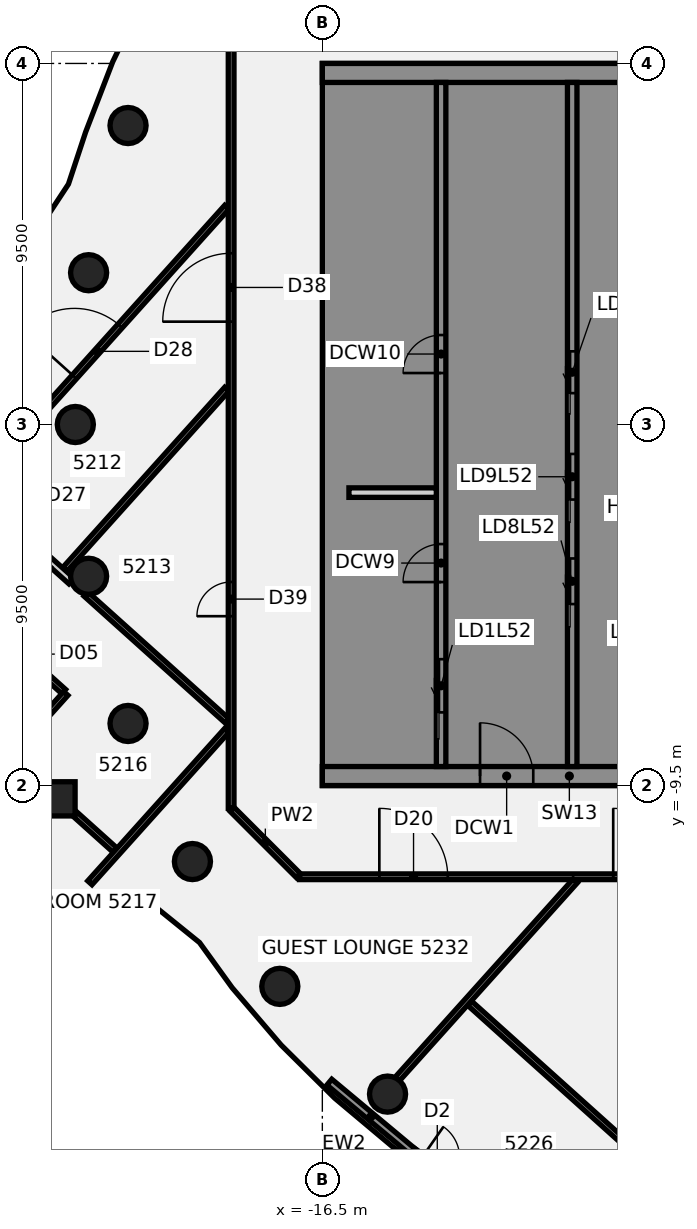
"""IFC4 building model, lengths in metres.
Left out: names, types, materials, properties, quantities, classifications, styles, units other than length and angle.
Written with IfcOpenShell. Run it as: python <this file> out.ifc"""

import sys

from ifc_helpers import new_model, si_unit, direction, frame, frame_2d, origin, origin_2d, place, context, subcontext, project, spatial, polyline, rectangle, circle, outline, extrude, element, fill, save


model = new_model("IFC4")
c1 = context("Model", 3, precision=1e-05, world=origin(), true_north=direction((0.0, 1.0)))
c2 = subcontext(c1, "Body", "Model", "MODEL_VIEW")
j1 = project(units=[si_unit("LENGTHUNIT", "METRE"), si_unit("PLANEANGLEUNIT", "RADIAN")], contexts=[c1])
p1 = place(None, origin())
s1 = spatial("IfcSite", under=j1, at=p1, CompositionType="ELEMENT")
p2 = place(p1, origin())
s2 = spatial("IfcBuilding", under=s1, at=p2, CompositionType="ELEMENT")
p3 = place(p2, frame((0.0, 0.0, 207.7)))
s3 = spatial("IfcBuildingStorey", under=s2, at=p3, CompositionType="ELEMENT", Elevation=207.7)
for number, where, z_axis, x_axis in (
    (1, (-21.613, 7.866, -0.14), (0.0, 0.0, 1.0), (1.0, 0.0, 0.0)),
    (2, (-22.651, 3.994, -0.14), (0.0, 0.0, 1.0), (1.0, 0.0, 0.0)),
    (3, (-23.0, 0.0, -0.14), (0.0, 0.0, 1.0), (1.0, 0.0, 0.0)),
    (4, (-22.651, -3.994, -0.14), (0.0, 0.0, 1.0), (1.0, 0.0, 0.0)),
    (5, (-21.613, -7.866, -0.14), (0.0, 0.0, 1.0), (1.0, 0.0, 0.0)),
    (6, (-19.919, -11.5, -0.14), (0.0, 0.0, 1.0), (1.0, 0.0, 0.0)),
    (7, (-17.619, -14.784, -0.14), (0.0, 0.0, 1.0), (1.0, 0.0, 0.0)),
    (8, (-14.784, -17.619, -0.14), (0.0, 0.0, 1.0), (1.0, 0.0, 0.0)),
):
    element("IfcColumn", number, at=place(p3, frame(where, z_axis=z_axis, x_axis=x_axis)), inside=s3, PredefinedType="COLUMN", context=c2, shape_type="SweptSolid", body=[
        extrude(circle(Radius=0.475, at=origin_2d()), origin(), (0.0, 0.0, 1.0), 3.6),
    ])
p4 = place(p3, frame((-23.456, -9.85, -0.139), z_axis=(0.049885715582, -0.006913509496, 0.998731004209), x_axis=(-0.742767998212, 0.668247415628, 0.04172639858)))
e9 = element("IfcColumn", 9, at=p4, inside=s3, PredefinedType="COLUMN", context=c2, shape_type="SweptSolid", body=[
    extrude(rectangle(XDim=0.9, YDim=0.9, at=origin_2d()), origin(), (0.0, 0.0, 1.0), 3.602),
])
p5 = place(p3, frame((-18.872, -10.128, 0.0), z_axis=(0.0, 0.0, 1.0), x_axis=(0.707106781187, -0.707106781187, 0.0)))
e10 = element("IfcWall", 10, at=p5, inside=s3, PredefinedType="PARTITIONING", context=c2, shape_type="SweptSolid", body=[
    extrude(rectangle(XDim=2.465, YDim=0.15, at=frame_2d((1.232, 0.0))), origin(), (0.0, 0.0, 1.0), 2.864),
])
p6 = place(p3, frame((-29.523, 1.65, 0.0), z_axis=(0.0, 0.0, 1.0), x_axis=(0.743912674532, -0.668276838346, 0.0)))
e11 = element("IfcWall", 11, at=p6, inside=s3, PredefinedType="PARTITIONING", context=c2, shape_type="SweptSolid", body=[
    extrude(rectangle(XDim=8.631, YDim=0.2, at=frame_2d((4.316, 0.0))), origin(), (0.0, 0.0, 1.0), 2.864),
])
p7 = place(p6, frame((5.8, 0.0, 0.0)))
e12 = element("IfcOpeningElement", 12, at=p7, cuts=e11, PredefinedType="OPENING", context=c2, shape_type="SweptSolid", body=[
    extrude(rectangle(XDim=1.4, YDim=2.1, at=frame_2d((0.7, 1.05))), frame((0.0, 0.11, 0.0), z_axis=(0.0, -1.0, 0.0), x_axis=(1.0, 0.0, 0.0)), (0.0, 0.0, 1.0), 0.22),
])
p8 = place(p3, frame((-22.722, -4.46, 0.0), z_axis=(0.0, 0.0, 1.0), x_axis=(0.743940554758, -0.668245801323, 0.0)))
e13 = element("IfcWall", 13, at=p8, inside=s3, PredefinedType="PARTITIONING", context=c2, shape_type="SweptSolid", body=[
    extrude(rectangle(XDim=4.993, YDim=0.15, at=frame_2d((2.497, 0.0))), origin(), (0.0, 0.0, 1.0), 2.864),
])
p9 = place(p3, frame((-23.007, -10.254, 0.0), z_axis=(0.0, 0.0, 1.0), x_axis=(0.743791407792, -0.668411805472, 0.0)))
e14 = element("IfcWall", 14, at=p9, inside=s3, PredefinedType="PARTITIONING", context=c2, shape_type="SweptSolid", body=[
    extrude(rectangle(XDim=1.415, YDim=0.15, at=frame_2d((0.708, 0.0))), origin(), (0.0, 0.0, 1.0), 2.864),
])
p10 = place(p3, frame((-25.125, -5.394, 0.0), z_axis=(0.0, 0.0, 1.0), x_axis=(0.743993991254, -0.668186307087, 0.0)))
e15 = element("IfcWall", 15, at=p10, inside=s3, PredefinedType="PARTITIONING", context=c2, shape_type="SweptSolid", body=[
    extrude(rectangle(XDim=2.444, YDim=0.15, at=frame_2d((1.222, 0.0))), origin(), (0.0, 0.0, 1.0), 2.864),
])
p11 = place(p10, frame((0.52, 0.0, 0.0)))
e16 = element("IfcOpeningElement", 16, at=p11, cuts=e15, PredefinedType="OPENING", context=c2, shape_type="SweptSolid", body=[
    extrude(rectangle(XDim=0.9, YDim=2.1, at=frame_2d((0.45, 1.05))), frame((0.0, 0.085, 0.0), z_axis=(0.0, -1.0, 0.0), x_axis=(1.0, 0.0, 0.0)), (0.0, 0.0, 1.0), 0.17),
])
p12 = place(p3, frame((-12.626, -15.226, 0.0), z_axis=(0.0, 0.0, 1.0), x_axis=(0.743821581371, -0.668378227567, 0.0)))
e17 = element("IfcWall", 17, at=p12, inside=s3, PredefinedType="PARTITIONING", context=c2, shape_type="SweptSolid", body=[
    extrude(rectangle(XDim=11.158, YDim=0.15, at=frame_2d((5.579, 0.0))), origin(), (0.0, 0.0, 1.0), 2.864),
])
p13 = place(p12, frame((6.37, 0.0, 0.0)))
e18 = element("IfcOpeningElement", 18, at=p13, cuts=e17, PredefinedType="OPENING", context=c2, shape_type="SweptSolid", body=[
    extrude(rectangle(XDim=0.9, YDim=2.1, at=frame_2d((0.45, 1.05))), frame((0.0, 0.085, 0.0), z_axis=(0.0, -1.0, 0.0), x_axis=(1.0, 0.0, 0.0)), (0.0, 0.0, 1.0), 0.17),
])
p14 = place(p3, frame((-17.1, -11.9, 0.0), z_axis=(0.0, 0.0, 1.0), x_axis=(1.0, 0.0, 0.0)))
e19 = element("IfcWall", 19, at=p14, inside=s3, PredefinedType="PARTITIONING", context=c2, shape_type="SweptSolid", body=[
    extrude(rectangle(XDim=34.165, YDim=0.15, at=frame_2d((17.083, 0.0))), origin(), (0.0, 0.0, 1.0), 2.864),
])
p15 = place(p14, frame((8.254, 0.0, 0.0)))
e20 = element("IfcOpeningElement", 20, at=p15, cuts=e19, PredefinedType="OPENING", context=c2, shape_type="SweptSolid", body=[
    extrude(rectangle(XDim=1.8, YDim=2.1, at=frame_2d((0.9, 1.05))), frame((0.0, 0.085, 0.0), z_axis=(0.0, -1.0, 0.0), x_axis=(1.0, 0.0, 0.0)), (0.0, 0.0, 1.0), 0.17),
])
p16 = place(p14, frame((2.1, 0.0, 0.0)))
e21 = element("IfcOpeningElement", 21, at=p16, cuts=e19, PredefinedType="OPENING", context=c2, shape_type="SweptSolid", body=[
    extrude(rectangle(XDim=1.8, YDim=2.1, at=frame_2d((0.9, 1.05))), frame((0.0, 0.085, 0.0), z_axis=(0.0, -1.0, 0.0), x_axis=(1.0, 0.0, 0.0)), (0.0, 0.0, 1.0), 0.17),
])
p17 = place(p14, frame((24.936, 0.0, 0.0)))
e22 = element("IfcOpeningElement", 22, at=p17, cuts=e19, PredefinedType="OPENING", context=c2, shape_type="SweptSolid", body=[
    extrude(rectangle(XDim=1.8, YDim=2.1, at=frame_2d((0.9, 1.05))), frame((0.0, 0.085, 0.0), z_axis=(0.0, -1.0, 0.0), x_axis=(1.0, 0.0, 0.0)), (0.0, 0.0, 1.0), 0.17),
])
p18 = place(p3, frame((-26.191, -10.35, 0.0), z_axis=(0.0, 0.0, 1.0), x_axis=(0.66834223487, 0.743853921875, 0.0)))
e23 = element("IfcWall", 23, at=p18, inside=s3, PredefinedType="PARTITIONING", context=c2, shape_type="SweptSolid", body=[
    extrude(rectangle(XDim=4.4, YDim=0.15, at=frame_2d((2.2, 0.0))), origin(), (0.0, 0.0, 1.0), 2.864),
])
p19 = place(p3, frame((-25.663, -1.683, 0.0), z_axis=(0.0, 0.0, 1.0), x_axis=(0.668369322351, 0.743829583265, 0.0)))
e24 = element("IfcWall", 24, at=p19, inside=s3, PredefinedType="PARTITIONING", context=c2, shape_type="SweptSolid", body=[
    extrude(rectangle(XDim=9.949, YDim=0.15, at=frame_2d((4.974, 0.0))), origin(), (0.0, 0.0, 1.0), 2.864),
])
p20 = place(p19, frame((3.95, 0.0, 0.0)))
e25 = element("IfcOpeningElement", 25, at=p20, cuts=e24, PredefinedType="OPENING", context=c2, shape_type="SweptSolid", body=[
    extrude(rectangle(XDim=1.8, YDim=2.1, at=frame_2d((0.9, 1.05))), frame((0.0, 0.085, 0.0), z_axis=(0.0, -1.0, 0.0), x_axis=(1.0, 0.0, 0.0)), (0.0, 0.0, 1.0), 0.17),
])
p21 = place(p3, frame((-23.27, -3.807, 0.0), z_axis=(0.0, 0.0, 1.0), x_axis=(0.668392601197, 0.74380866536, 0.0)))
e26 = element("IfcWall", 26, at=p21, inside=s3, PredefinedType="PARTITIONING", context=c2, shape_type="SweptSolid", body=[
    extrude(rectangle(XDim=6.368, YDim=0.15, at=frame_2d((3.184, 0.0))), origin(), (0.0, 0.0, 1.0), 2.864),
])
p22 = place(p3, frame((-22.617, -12.059, 0.0), z_axis=(0.0, 0.0, 1.0), x_axis=(0.668266543516, 0.743921922528, 0.0)))
e27 = element("IfcWall", 27, at=p22, inside=s3, PredefinedType="PARTITIONING", context=c2, shape_type="SweptSolid", body=[
    extrude(rectangle(XDim=5.392, YDim=0.15, at=frame_2d((2.696, 0.0))), origin(), (0.0, 0.0, 1.0), 2.864),
])
p23 = place(p3, frame((-14.523, -17.217, 0.0), z_axis=(0.0, 0.0, 1.0), x_axis=(0.668288418093, 0.743902271971, 0.0)))
e28 = element("IfcWall", 28, at=p23, inside=s3, PredefinedType="PARTITIONING", context=c2, shape_type="SweptSolid", body=[
    extrude(rectangle(XDim=7.003, YDim=0.15, at=frame_2d((3.501, 0.0))), origin(), (0.0, 0.0, 1.0), 2.864),
])
p24 = place(p3, frame((-18.9, -10.1, 0.0), z_axis=(0.0, 0.0, 1.0), x_axis=(0.0, 1.0, 0.0)))
e29 = element("IfcWall", 29, at=p24, inside=s3, PredefinedType="PARTITIONING", context=c2, shape_type="SweptSolid", body=[
    extrude(rectangle(XDim=20.2, YDim=0.15, at=frame_2d((10.1, 0.0))), origin(), (0.0, 0.0, 1.0), 2.864),
])
p25 = place(p24, frame((12.806, 0.0, 0.0)))
e30 = element("IfcOpeningElement", 30, at=p25, cuts=e29, PredefinedType="OPENING", context=c2, shape_type="SweptSolid", body=[
    extrude(rectangle(XDim=1.8, YDim=2.1, at=frame_2d((0.9, 1.05))), frame((0.0, 0.085, 0.0), z_axis=(0.0, -1.0, 0.0), x_axis=(1.0, 0.0, 0.0)), (0.0, 0.0, 1.0), 0.17),
])
p26 = place(p24, frame((5.056, 0.0, 0.0)))
e31 = element("IfcOpeningElement", 31, at=p26, cuts=e29, PredefinedType="OPENING", context=c2, shape_type="SweptSolid", body=[
    extrude(rectangle(XDim=0.9, YDim=2.1, at=frame_2d((0.45, 1.05))), frame((0.0, 0.085, 0.0), z_axis=(0.0, -1.0, 0.0), x_axis=(1.0, 0.0, 0.0)), (0.0, 0.0, 1.0), 0.17),
])
p27 = place(p3, frame((-16.315, -17.304, 0.0), z_axis=(0.0, 0.0, 1.0), x_axis=(0.767848233203, -0.640631790318, 0.0)))
e32 = element("IfcWall", 32, at=p27, inside=s3, PredefinedType="SOLIDWALL", context=c2, shape_type="SweptSolid", body=[
    extrude(rectangle(XDim=2.844, YDim=0.2, at=frame_2d((1.422, 0.0))), origin(), (0.0, 0.0, 1.0), 3.46),
])
p28 = place(p3, frame((-14.132, -19.126, 0.0), z_axis=(0.0, 0.0, 1.0), x_axis=(0.820148605053, -0.572150562029, 0.0)))
e33 = element("IfcWall", 33, at=p28, inside=s3, PredefinedType="SOLIDWALL", context=c2, shape_type="SweptSolid", body=[
    extrude(rectangle(XDim=1.6, YDim=0.2, at=frame_2d((0.8, 0.0))), origin(), (0.0, 0.0, 1.0), 3.46),
])
p29 = place(p28, frame((0.3, 0.0, 0.0)))
e34 = element("IfcOpeningElement", 34, at=p29, cuts=e33, PredefinedType="OPENING", context=c2, shape_type="SweptSolid", body=[
    extrude(rectangle(XDim=1.0, YDim=2.4, at=frame_2d((0.5, 1.2))), frame((0.0, 0.11, 0.0), z_axis=(0.0, -1.0, 0.0), x_axis=(1.0, 0.0, 0.0)), (0.0, 0.0, 1.0), 0.22),
])
p30 = place(p3, frame((-16.5, -9.25, 0.0), z_axis=(0.0, 0.0, 1.0), x_axis=(1.0, 0.0, 0.0)))
e35 = element("IfcWall", 35, at=p30, inside=s3, PredefinedType="SHEAR", context=c2, shape_type="SweptSolid", body=[
    extrude(rectangle(XDim=13.0, YDim=0.5, at=frame_2d((6.5, 0.0))), origin(), (0.0, 0.0, 1.0), 3.46),
])
p31 = place(p30, frame((4.15, 0.0, 0.0)))
e36 = element("IfcOpeningElement", 36, at=p31, cuts=e35, PredefinedType="OPENING", context=c2, shape_type="SweptSolid", body=[
    extrude(rectangle(XDim=1.4, YDim=2.1, at=frame_2d((0.7, 1.05))), frame((0.0, 0.26, 0.0), z_axis=(0.0, -1.0, 0.0), x_axis=(1.0, 0.0, 0.0)), (0.0, 0.0, 1.0), 0.52),
])
p32 = place(p30, frame((10.125, 0.0, 0.0)))
e37 = element("IfcOpeningElement", 37, at=p32, cuts=e35, PredefinedType="OPENING", context=c2, shape_type="SweptSolid", body=[
    extrude(rectangle(XDim=1.4, YDim=2.1, at=frame_2d((0.7, 1.05))), frame((0.0, 0.26, 0.0), z_axis=(0.0, -1.0, 0.0), x_axis=(1.0, 0.0, 0.0)), (0.0, 0.0, 1.0), 0.52),
])
p33 = place(p3, origin())
e38 = element("IfcWall", 38, at=p33, inside=s3, PredefinedType="SHEAR", context=c2, shape_type="SweptSolid", body=[
    extrude(outline(polyline([(-13.5, -8.125), (-16.0, -8.125), (-16.0, -5.625), (-13.5, -5.625), (-13.5, -5.375), (-16.0, -5.375), (-16.0, 5.375), (-13.5, 5.375), (-13.5, 5.625), (-16.0, 5.625), (-16.0, 8.125), (-13.5, 8.125), (-13.5, 9.0), (-16.0, 9.0), (-16.5, 9.0), (-16.5, -9.0), (-16.0, -9.0), (-13.5, -9.0), (-13.5, -8.125)])), origin(), (0.0, 0.0, 1.0), 3.46),
])
p34 = place(p3, frame((-16.5, 9.25, 0.0), z_axis=(0.0, 0.0, 1.0), x_axis=(1.0, 0.0, 0.0)))
e39 = element("IfcWall", 39, at=p34, inside=s3, PredefinedType="SHEAR", context=c2, shape_type="SweptSolid", body=[
    extrude(rectangle(XDim=13.0, YDim=0.5, at=frame_2d((6.5, 0.0))), origin(), (0.0, 0.0, 1.0), 3.46),
])
p35 = place(p3, origin())
e40 = element("IfcWall", 40, at=p35, inside=s3, PredefinedType="SHEAR", context=c2, shape_type="SweptSolid", body=[
    extrude(outline(polyline([(-9.8, -5.375), (-9.8, -5.625), (-7.5, -5.625), (-7.25, -5.625), (-7.25, 9.0), (-7.5, 9.0), (-9.8, 9.0), (-9.8, 8.125), (-7.5, 8.125), (-7.5, 5.625), (-9.8, 5.625), (-9.8, 5.375), (-7.5, 5.375), (-7.5, 2.875), (-9.8, 2.875), (-9.8, 2.625), (-7.5, 2.625), (-7.5, 0.125), (-9.8, 0.125), (-9.8, -0.125), (-7.5, -0.125), (-7.5, -2.625), (-9.8, -2.625), (-9.8, -2.875), (-7.5, -2.875), (-7.5, -5.375), (-9.8, -5.375)])), origin(), (0.0, 0.0, 1.0), 3.46),
])
p36 = place(p3, origin())
e41 = element("IfcWall", 41, at=p36, inside=s3, PredefinedType="SHEAR", context=c2, shape_type="SweptSolid", body=[
    extrude(outline(polyline([(-7.5, -8.125), (-9.55, -8.125), (-9.55, -5.625), (-9.8, -5.625), (-9.8, -8.125), (-9.8, -9.0), (-7.5, -9.0), (-7.5, -8.125)])), origin(), (0.0, 0.0, 1.0), 3.46),
])
p37 = place(p3, frame((-13.375, -9.0, 0.0), z_axis=(0.0, 0.0, 1.0), x_axis=(0.0, 1.0, 0.0)))
e42 = element("IfcWall", 42, at=p37, inside=s3, PredefinedType="SHEAR", context=c2, shape_type="SweptSolid", body=[
    extrude(rectangle(XDim=18.0, YDim=0.25, at=frame_2d((9.0, 0.0))), origin(), (0.0, 0.0, 1.0), 3.46),
])
p38 = place(p37, frame((1.425, 0.0, 0.0)))
e43 = element("IfcOpeningElement", 43, at=p38, cuts=e42, PredefinedType="OPENING", context=c2, shape_type="SweptSolid", body=[
    extrude(rectangle(XDim=1.4, YDim=2.1, at=frame_2d((0.7, 1.05))), frame((0.0, 0.135, 0.0), z_axis=(0.0, -1.0, 0.0), x_axis=(1.0, 0.0, 0.0)), (0.0, 0.0, 1.0), 0.27),
])
p39 = place(p37, frame((4.854, 0.0, 0.0)))
e44 = element("IfcOpeningElement", 44, at=p39, cuts=e42, PredefinedType="OPENING", context=c2, shape_type="SweptSolid", body=[
    extrude(rectangle(XDim=1.0, YDim=2.1, at=frame_2d((0.5, 1.05))), frame((0.0, 0.135, 0.0), z_axis=(0.0, -1.0, 0.0), x_axis=(1.0, 0.0, 0.0)), (0.0, 0.0, 1.0), 0.27),
])
p40 = place(p37, frame((10.354, 0.0, 0.0)))
e45 = element("IfcOpeningElement", 45, at=p40, cuts=e42, PredefinedType="OPENING", context=c2, shape_type="SweptSolid", body=[
    extrude(rectangle(XDim=1.0, YDim=2.1, at=frame_2d((0.5, 1.05))), frame((0.0, 0.135, 0.0), z_axis=(0.0, -1.0, 0.0), x_axis=(1.0, 0.0, 0.0)), (0.0, 0.0, 1.0), 0.27),
])
p41 = place(p3, frame((-9.925, -9.0, 0.0), z_axis=(0.0, 0.0, 1.0), x_axis=(0.0, 1.0, 0.0)))
e46 = element("IfcWall", 46, at=p41, inside=s3, PredefinedType="SHEAR", context=c2, shape_type="SweptSolid", body=[
    extrude(rectangle(XDim=18.0, YDim=0.25, at=frame_2d((9.0, 0.0))), origin(), (0.0, 0.0, 1.0), 3.46),
])
p42 = place(p41, frame((4.275, 0.0, 0.0)))
e47 = element("IfcOpeningElement", 47, at=p42, cuts=e46, PredefinedType="OPENING", context=c2, shape_type="SweptSolid", body=[
    extrude(rectangle(XDim=1.2, YDim=2.1, at=frame_2d((0.6, 1.05))), frame((0.0, 0.135, 0.0), z_axis=(0.0, -1.0, 0.0), x_axis=(1.0, 0.0, 0.0)), (0.0, 0.0, 1.0), 0.27),
])
p43 = place(p41, frame((7.025, 0.0, 0.0)))
e48 = element("IfcOpeningElement", 48, at=p43, cuts=e46, PredefinedType="OPENING", context=c2, shape_type="SweptSolid", body=[
    extrude(rectangle(XDim=1.2, YDim=2.1, at=frame_2d((0.6, 1.05))), frame((0.0, 0.135, 0.0), z_axis=(0.0, -1.0, 0.0), x_axis=(1.0, 0.0, 0.0)), (0.0, 0.0, 1.0), 0.27),
])
p44 = place(p41, frame((9.825, 0.0, 0.0)))
e49 = element("IfcOpeningElement", 49, at=p44, cuts=e46, PredefinedType="OPENING", context=c2, shape_type="SweptSolid", body=[
    extrude(rectangle(XDim=1.1, YDim=2.1, at=frame_2d((0.55, 1.05))), frame((0.0, 0.135, 0.0), z_axis=(0.0, -1.0, 0.0), x_axis=(1.0, 0.0, 0.0)), (0.0, 0.0, 1.0), 0.27),
])
p45 = place(p3, frame((-15.8, -1.792, 0.0), z_axis=(0.0, 0.0, 1.0), x_axis=(1.0, 0.0, 0.0)))
e50 = element("IfcWall", 50, at=p45, inside=s3, PredefinedType="PARTITIONING", context=c2, shape_type="SweptSolid", body=[
    extrude(rectangle(XDim=2.3, YDim=0.25, at=frame_2d((1.15, 0.0))), origin(), (0.0, 0.0, 1.0), 3.46),
])
p46 = place(p15, origin())
e51 = element("IfcDoor", 51, at=p46, inside=s3, OperationType="DOUBLE_DOOR_SINGLE_SWING", PredefinedType="DOOR", context=c2, shape_type="SweptSolid", body=[
    extrude(rectangle(XDim=1.8, YDim=2.1, at=frame_2d((0.9, 1.05))), frame((0.0, 0.025, 0.0), z_axis=(0.0, -1.0, 0.0), x_axis=(1.0, 0.0, 0.0)), (0.0, 0.0, 1.0), 0.05),
])
fill(e20, e51)
p47 = place(p16, frame((1.8, 0.0, 0.0), z_axis=(0.0, 0.0, 1.0), x_axis=(-1.0, 0.0, 0.0)))
e52 = element("IfcDoor", 52, at=p47, inside=s3, OperationType="DOUBLE_DOOR_SINGLE_SWING", PredefinedType="DOOR", context=c2, shape_type="SweptSolid", body=[
    extrude(rectangle(XDim=1.8, YDim=2.1, at=frame_2d((0.9, 1.05))), frame((0.0, 0.025, 0.0), z_axis=(0.0, -1.0, 0.0), x_axis=(1.0, 0.0, 0.0)), (0.0, 0.0, 1.0), 0.05),
])
fill(e21, e52)
p48 = place(p20, origin())
e53 = element("IfcDoor", 53, at=p48, inside=s3, OperationType="DOUBLE_DOOR_SINGLE_SWING", PredefinedType="DOOR", context=c2, shape_type="SweptSolid", body=[
    extrude(rectangle(XDim=1.8, YDim=2.1, at=frame_2d((0.9, 1.05))), frame((0.0, 0.025, 0.0), z_axis=(0.0, -1.0, 0.0), x_axis=(1.0, 0.0, 0.0)), (0.0, 0.0, 1.0), 0.05),
])
fill(e25, e53)
p49 = place(p25, frame((1.8, 0.0, 0.0), z_axis=(0.0, 0.0, 1.0), x_axis=(-1.0, 0.0, 0.0)))
e54 = element("IfcDoor", 54, at=p49, inside=s3, OperationType="DOUBLE_DOOR_SINGLE_SWING", PredefinedType="DOOR", context=c2, shape_type="SweptSolid", body=[
    extrude(rectangle(XDim=1.8, YDim=2.1, at=frame_2d((0.9, 1.05))), frame((0.0, 0.025, 0.0), z_axis=(0.0, -1.0, 0.0), x_axis=(1.0, 0.0, 0.0)), (0.0, 0.0, 1.0), 0.05),
])
fill(e30, e54)
p50 = place(p26, origin())
e55 = element("IfcDoor", 55, at=p50, inside=s3, OperationType="SINGLE_SWING_RIGHT", PredefinedType="DOOR", context=c2, shape_type="SweptSolid", body=[
    extrude(rectangle(XDim=0.9, YDim=2.1, at=frame_2d((0.45, 1.05))), frame((0.0, 0.025, 0.0), z_axis=(0.0, -1.0, 0.0), x_axis=(1.0, 0.0, 0.0)), (0.0, 0.0, 1.0), 0.05),
])
fill(e31, e55)
p51 = place(p31, origin())
e56 = element("IfcDoor", 56, at=p51, inside=s3, OperationType="SINGLE_SWING_LEFT", PredefinedType="DOOR", context=c2, shape_type="SweptSolid", body=[
    extrude(rectangle(XDim=1.4, YDim=2.1, at=frame_2d((0.7, 1.05))), frame((0.0, 0.025, 0.0), z_axis=(0.0, -1.0, 0.0), x_axis=(1.0, 0.0, 0.0)), (0.0, 0.0, 1.0), 0.05),
])
fill(e36, e56)
p52 = place(p38, origin())
e57 = element("IfcDoor", 57, at=p52, inside=s3, OperationType="SLIDING_TO_LEFT", PredefinedType="DOOR", context=c2, shape_type="SweptSolid", body=[
    extrude(rectangle(XDim=1.4, YDim=2.1, at=frame_2d((0.7, 1.05))), frame((0.0, 0.025, 0.0), z_axis=(0.0, -1.0, 0.0), x_axis=(1.0, 0.0, 0.0)), (0.0, 0.0, 1.0), 0.05),
])
fill(e43, e57)
p53 = place(p42, origin())
e58 = element("IfcDoor", 58, at=p53, inside=s3, OperationType="SLIDING_TO_LEFT", PredefinedType="DOOR", context=c2, shape_type="SweptSolid", body=[
    extrude(rectangle(XDim=1.2, YDim=2.1, at=frame_2d((0.6, 1.05))), frame((0.0, 0.025, 0.0), z_axis=(0.0, -1.0, 0.0), x_axis=(1.0, 0.0, 0.0)), (0.0, 0.0, 1.0), 0.05),
])
fill(e47, e58)
p54 = place(p43, origin())
e59 = element("IfcDoor", 59, at=p54, inside=s3, OperationType="SLIDING_TO_LEFT", PredefinedType="DOOR", context=c2, shape_type="SweptSolid", body=[
    extrude(rectangle(XDim=1.2, YDim=2.1, at=frame_2d((0.6, 1.05))), frame((0.0, 0.025, 0.0), z_axis=(0.0, -1.0, 0.0), x_axis=(1.0, 0.0, 0.0)), (0.0, 0.0, 1.0), 0.05),
])
fill(e48, e59)
p55 = place(p44, origin())
e60 = element("IfcDoor", 60, at=p55, inside=s3, OperationType="SLIDING_TO_LEFT", PredefinedType="DOOR", context=c2, shape_type="SweptSolid", body=[
    extrude(rectangle(XDim=1.1, YDim=2.1, at=frame_2d((0.55, 1.05))), frame((0.0, 0.025, 0.0), z_axis=(0.0, -1.0, 0.0), x_axis=(1.0, 0.0, 0.0)), (0.0, 0.0, 1.0), 0.05),
])
fill(e49, e60)
p56 = place(p39, origin())
e61 = element("IfcDoor", 61, at=p56, inside=s3, OperationType="SINGLE_SWING_LEFT", PredefinedType="DOOR", context=c2, shape_type="SweptSolid", body=[
    extrude(rectangle(XDim=1.0, YDim=2.1, at=frame_2d((0.5, 1.05))), frame((0.0, 0.025, 0.0), z_axis=(0.0, -1.0, 0.0), x_axis=(1.0, 0.0, 0.0)), (0.0, 0.0, 1.0), 0.05),
])
fill(e44, e61)
p57 = place(p40, origin())
e62 = element("IfcDoor", 62, at=p57, inside=s3, OperationType="SINGLE_SWING_LEFT", PredefinedType="DOOR", context=c2, shape_type="SweptSolid", body=[
    extrude(rectangle(XDim=1.0, YDim=2.1, at=frame_2d((0.5, 1.05))), frame((0.0, 0.025, 0.0), z_axis=(0.0, -1.0, 0.0), x_axis=(1.0, 0.0, 0.0)), (0.0, 0.0, 1.0), 0.05),
])
fill(e45, e62)
save(model, sys.argv[1])
